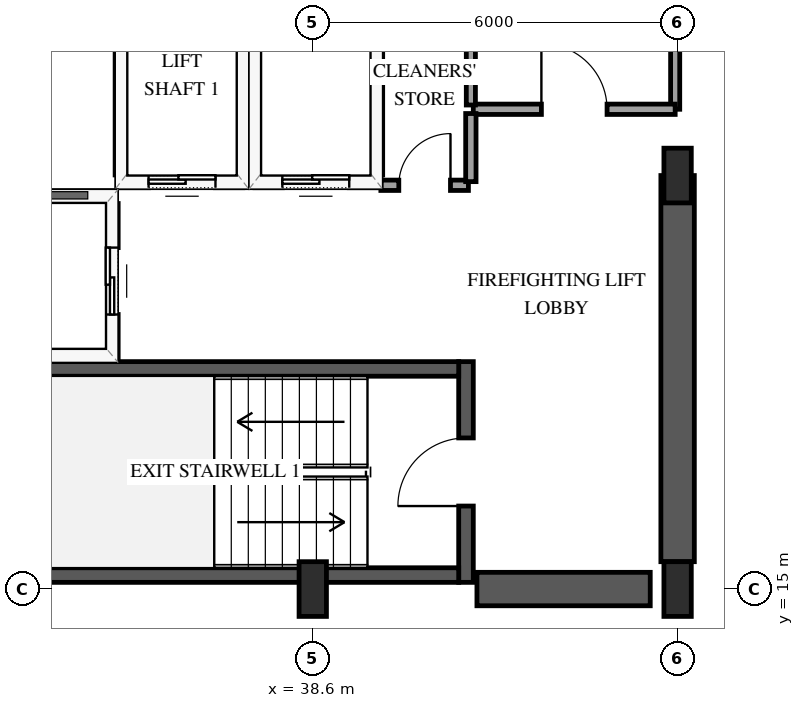
"""IFC4 building model, lengths in metres.
Left out: names, types, materials, properties, quantities, classifications, styles, units other than length and angle.
Written with IfcOpenShell. Run it as: python <this file> out.ifc"""

import sys

from ifc_helpers import new_model, si_unit, direction, frame, frame_2d, origin, origin_2d, place, context, subcontext, project, spatial, rectangle, extrude, element, fill, save


model = new_model("IFC4")
c1 = context("Model", 3, precision=1e-05, world=origin(), true_north=direction((0.0, 1.0)))
c2 = subcontext(c1, "Body", "Model", "MODEL_VIEW")
j1 = project(units=[si_unit("LENGTHUNIT", "METRE"), si_unit("PLANEANGLEUNIT", "RADIAN")], contexts=[c1])
p1 = place(None, origin())
s1 = spatial("IfcSite", under=j1, at=p1, CompositionType="ELEMENT")
p2 = place(p1, origin())
s2 = spatial("IfcBuilding", under=s1, at=p2, CompositionType="ELEMENT")
p3 = place(p2, frame((0.0, 0.0, 153.4)))
s3 = spatial("IfcBuildingStorey", under=s2, at=p3, CompositionType="ELEMENT", Elevation=153.4)
p4 = place(p3, frame((41.12, 15.11, 0.0), z_axis=(0.0, 0.0, 1.0), x_axis=(0.0, 1.0, 0.0)))
e1 = element("IfcWall", 1, at=p4, inside=s3, PredefinedType="SHEAR", context=c2, shape_type="SweptSolid", body=[
    extrude(rectangle(XDim=3.63, YDim=0.24, at=frame_2d((1.815, 0.0))), origin(), (0.0, 0.0, 1.0), 3.6),
])
p5 = place(p4, frame((1.255, 0.0, 0.0)))
e2 = element("IfcOpeningElement", 2, at=p5, cuts=e1, PredefinedType="OPENING", context=c2, shape_type="SweptSolid", body=[
    extrude(rectangle(XDim=1.12, YDim=2.15, at=frame_2d((0.56, 1.075))), frame((0.0, 0.13, 0.0), z_axis=(0.0, -1.0, 0.0), x_axis=(1.0, 0.0, 0.0)), (0.0, 0.0, 1.0), 0.26),
])
for number, where, z_axis, x_axis in (
    (3, (33.0, 15.23, 0.0), (0.0, 0.0, 1.0), (1.0, 0.0, 0.0)),
    (4, (33.0, 18.62, 0.0), (0.0, 0.0, 1.0), (1.0, 0.0, 0.0)),
):
    element("IfcWall", number, at=place(p3, frame(where, z_axis=z_axis, x_axis=x_axis)), inside=s3, PredefinedType="SHEAR", context=c2, shape_type="SweptSolid", body=[
        extrude(rectangle(XDim=8.0, YDim=0.24, at=frame_2d((4.0, 0.0))), origin(), (0.0, 0.0, 1.0), 3.6),
    ])
p6 = place(p3, frame((41.3, 15.0, 0.0), z_axis=(0.0, 0.0, 1.0), x_axis=(1.0, 0.0, 0.0)))
e5 = element("IfcWall", 5, at=p6, inside=s3, PredefinedType="SHEAR", context=c2, shape_type="SweptSolid", body=[
    extrude(rectangle(XDim=2.85, YDim=0.55, at=frame_2d((1.425, 0.0))), origin(), (0.0, 0.0, 1.0), 3.6),
])
p7 = place(p3, frame((44.6, 15.45, 0.0), z_axis=(0.0, 0.0, 1.0), x_axis=(0.0, 1.0, 0.0)))
e6 = element("IfcWall", 6, at=p7, inside=s3, PredefinedType="SHEAR", context=c2, shape_type="SweptSolid", body=[
    extrude(rectangle(XDim=6.35, YDim=0.55, at=frame_2d((3.175, 0.0))), origin(), (0.0, 0.0, 1.0), 3.6),
])
for number, where, z_axis, x_axis in (
    (7, (38.6, 15.0, 0.0), (0.0, 0.0, 1.0), (1.0, 0.0, 0.0)),
    (8, (44.6, 15.0, 0.0), (0.0, 0.0, 1.0), (1.0, 0.0, 0.0)),
    (9, (44.6, 21.8, 0.0), (0.0, 0.0, 1.0), (1.0, 0.0, 0.0)),
):
    element("IfcColumn", number, at=place(p3, frame(where, z_axis=z_axis, x_axis=x_axis)), inside=s3, PredefinedType="PILASTER", context=c2, shape_type="SweptSolid", body=[
        extrude(rectangle(XDim=0.45, YDim=0.9, at=origin_2d()), origin(), (0.0, 0.0, 1.0), 3.6),
    ])
p8 = place(p3, frame((35.45, 21.7, 0.0), z_axis=(0.0, 0.0, 1.0), x_axis=(1.0, 0.0, 0.0)))
e10 = element("IfcWall", 10, at=p8, inside=s3, PredefinedType="SOLIDWALL", context=c2, shape_type="SweptSolid", body=[
    extrude(rectangle(XDim=2.0, YDim=0.2, at=frame_2d((1.0, 0.0))), origin(), (0.0, 0.0, 1.0), 3.3),
])
p9 = place(p8, frame((0.45, 0.0, 0.0)))
e11 = element("IfcOpeningElement", 11, at=p9, cuts=e10, PredefinedType="OPENING", context=c2, shape_type="SweptSolid", body=[
    extrude(rectangle(XDim=1.1, YDim=2.15, at=frame_2d((0.55, 1.075))), frame((0.0, 0.11, 0.0), z_axis=(0.0, -1.0, 0.0), x_axis=(1.0, 0.0, 0.0)), (0.0, 0.0, 1.0), 0.22),
])
for number, where, z_axis, x_axis in (
    (12, (35.45, 21.81, 0.0), (0.0, 0.0, 1.0), (0.0, 1.0, 0.0)),
    (13, (37.45, 21.81, 0.0), (0.0, 0.0, 1.0), (0.0, 1.0, 0.0)),
):
    element("IfcWall", number, at=place(p3, frame(where, z_axis=z_axis, x_axis=x_axis)), inside=s3, PredefinedType="SOLIDWALL", context=c2, shape_type="SweptSolid", body=[
        extrude(rectangle(XDim=2.38, YDim=0.2, at=frame_2d((1.19, 0.0))), origin(), (0.0, 0.0, 1.0), 3.3),
    ])
p10 = place(p3, frame((37.65, 21.7, 0.0), z_axis=(0.0, 0.0, 1.0), x_axis=(1.0, 0.0, 0.0)))
e14 = element("IfcWall", 14, at=p10, inside=s3, PredefinedType="SOLIDWALL", context=c2, shape_type="SweptSolid", body=[
    extrude(rectangle(XDim=2.0, YDim=0.2, at=frame_2d((1.0, 0.0))), origin(), (0.0, 0.0, 1.0), 3.3),
])
p11 = place(p10, frame((0.45, 0.0, 0.0)))
e15 = element("IfcOpeningElement", 15, at=p11, cuts=e14, PredefinedType="OPENING", context=c2, shape_type="SweptSolid", body=[
    extrude(rectangle(XDim=1.1, YDim=2.15, at=frame_2d((0.55, 1.075))), frame((0.0, 0.11, 0.0), z_axis=(0.0, -1.0, 0.0), x_axis=(1.0, 0.0, 0.0)), (0.0, 0.0, 1.0), 0.22),
])
p12 = place(p3, frame((39.65, 21.81, 0.0), z_axis=(0.0, 0.0, 1.0), x_axis=(0.0, 1.0, 0.0)))
e16 = element("IfcWall", 16, at=p12, inside=s3, PredefinedType="SOLIDWALL", context=c2, shape_type="SweptSolid", body=[
    extrude(rectangle(XDim=2.38, YDim=0.2, at=frame_2d((1.19, 0.0))), origin(), (0.0, 0.0, 1.0), 3.3),
])
p13 = place(p3, frame((32.72, 21.45, 0.0), z_axis=(0.0, 0.0, 1.0), x_axis=(1.0, 0.0, 0.0)))
e17 = element("IfcWall", 17, at=p13, inside=s3, PredefinedType="SOLIDWALL", context=c2, shape_type="SweptSolid", body=[
    extrude(rectangle(XDim=2.58, YDim=0.2, at=frame_2d((1.29, 0.0))), origin(), (0.0, 0.0, 1.0), 3.3),
])
p14 = place(p3, frame((35.3, 18.79, 0.0), z_axis=(0.0, 0.0, 1.0), x_axis=(0.0, 1.0, 0.0)))
e18 = element("IfcWall", 18, at=p14, inside=s3, PredefinedType="SOLIDWALL", context=c2, shape_type="SweptSolid", body=[
    extrude(rectangle(XDim=2.55, YDim=0.2, at=frame_2d((1.275, 0.0))), origin(), (0.0, 0.0, 1.0), 3.3),
])
p15 = place(p14, frame((0.725, 0.0, 0.0)))
e19 = element("IfcOpeningElement", 19, at=p15, cuts=e18, PredefinedType="OPENING", context=c2, shape_type="SweptSolid", body=[
    extrude(rectangle(XDim=1.1, YDim=2.15, at=frame_2d((0.55, 1.075))), frame((0.0, 0.11, 0.0), z_axis=(0.0, -1.0, 0.0), x_axis=(1.0, 0.0, 0.0)), (0.0, 0.0, 1.0), 0.22),
])
p16 = place(p3, frame((44.56, 29.8, 0.0), z_axis=(0.0, 0.0, 1.0), x_axis=(0.0, -1.0, 0.0)))
e20 = element("IfcWall", 20, at=p16, inside=s3, PredefinedType="PARTITIONING", context=c2, shape_type="SweptSolid", body=[
    extrude(rectangle(XDim=6.91, YDim=0.15, at=frame_2d((3.455, 0.0))), origin(), (0.0, 0.0, 1.0), 2.34),
])
p17 = place(p16, frame((2.915, 0.0, 0.0)))
e21 = element("IfcOpeningElement", 21, at=p17, cuts=e20, PredefinedType="OPENING", context=c2, shape_type="SweptSolid", body=[
    extrude(rectangle(XDim=1.08, YDim=2.15, at=frame_2d((0.54, 1.075))), frame((0.0, 0.085, 0.0), z_axis=(0.0, -1.0, 0.0), x_axis=(1.0, 0.0, 0.0)), (0.0, 0.0, 1.0), 0.17),
])
p18 = place(p3, frame((41.24, 22.89, 0.0), z_axis=(0.0, 0.0, 1.0), x_axis=(1.0, 0.0, 0.0)))
e22 = element("IfcWall", 22, at=p18, inside=s3, PredefinedType="PARTITIONING", context=c2, shape_type="SweptSolid", body=[
    extrude(rectangle(XDim=3.32, YDim=0.17, at=frame_2d((1.66, 0.0))), origin(), (0.0, 0.0, 1.0), 3.3),
])
p19 = place(p18, frame((1.12, 0.0, 0.0)))
e23 = element("IfcOpeningElement", 23, at=p19, cuts=e22, PredefinedType="OPENING", context=c2, shape_type="SweptSolid", body=[
    extrude(rectangle(XDim=1.08, YDim=2.15, at=frame_2d((0.54, 1.075))), frame((0.0, 0.095, 0.0), z_axis=(0.0, -1.0, 0.0), x_axis=(1.0, 0.0, 0.0)), (0.0, 0.0, 1.0), 0.19),
])
p20 = place(p3, frame((41.2, 22.96, 0.0), z_axis=(0.0, 0.0, 1.0), x_axis=(0.0, 1.0, 0.0)))
e24 = element("IfcWall", 24, at=p20, inside=s3, PredefinedType="PARTITIONING", context=c2, shape_type="SweptSolid", body=[
    extrude(rectangle(XDim=1.69, YDim=0.15, at=frame_2d((0.845, 0.0))), origin(), (0.0, 0.0, 1.0), 3.3),
])
p21 = place(p3, frame((39.72, 21.64, 0.0), z_axis=(0.0, 0.0, 1.0), x_axis=(1.0, 0.0, 0.0)))
e25 = element("IfcWall", 25, at=p21, inside=s3, PredefinedType="PARTITIONING", context=c2, shape_type="SweptSolid", body=[
    extrude(rectangle(XDim=1.44, YDim=0.17, at=frame_2d((0.72, 0.0))), origin(), (0.0, 0.0, 1.0), 3.3),
])
p22 = place(p21, frame((0.295, 0.0, 0.0)))
e26 = element("IfcOpeningElement", 26, at=p22, cuts=e25, PredefinedType="OPENING", context=c2, shape_type="SweptSolid", body=[
    extrude(rectangle(XDim=0.85, YDim=2.1, at=frame_2d((0.425, 1.05))), frame((0.0, 0.095, 0.0), z_axis=(0.0, -1.0, 0.0), x_axis=(1.0, 0.0, 0.0)), (0.0, 0.0, 1.0), 0.19),
])
p23 = place(p3, frame((41.2, 21.7, 0.0), z_axis=(0.0, 0.0, 1.0), x_axis=(0.0, 1.0, 0.0)))
e27 = element("IfcWall", 27, at=p23, inside=s3, PredefinedType="PARTITIONING", context=c2, shape_type="SweptSolid", body=[
    extrude(rectangle(XDim=1.12, YDim=0.17, at=frame_2d((0.56, 0.0))), origin(), (0.0, 0.0, 1.0), 3.3),
])
p24 = place(p9, origin())
e28 = element("IfcDoor", 28, at=p24, inside=s3, OperationType="SLIDING_TO_LEFT", PredefinedType="DOOR", context=c2, shape_type="SweptSolid", body=[
    extrude(rectangle(XDim=1.1, YDim=2.15, at=frame_2d((0.55, 1.075))), frame((0.0, 0.025, 0.0), z_axis=(0.0, -1.0, 0.0), x_axis=(1.0, 0.0, 0.0)), (0.0, 0.0, 1.0), 0.05),
])
fill(e11, e28)
p25 = place(p11, origin())
e29 = element("IfcDoor", 29, at=p25, inside=s3, OperationType="SLIDING_TO_LEFT", PredefinedType="DOOR", context=c2, shape_type="SweptSolid", body=[
    extrude(rectangle(XDim=1.1, YDim=2.15, at=frame_2d((0.55, 1.075))), frame((0.0, 0.025, 0.0), z_axis=(0.0, -1.0, 0.0), x_axis=(1.0, 0.0, 0.0)), (0.0, 0.0, 1.0), 0.05),
])
fill(e15, e29)
p26 = place(p15, origin())
e30 = element("IfcDoor", 30, at=p26, inside=s3, OperationType="SLIDING_TO_LEFT", PredefinedType="DOOR", context=c2, shape_type="SweptSolid", body=[
    extrude(rectangle(XDim=1.1, YDim=2.15, at=frame_2d((0.55, 1.075))), frame((0.0, 0.025, 0.0), z_axis=(0.0, -1.0, 0.0), x_axis=(1.0, 0.0, 0.0)), (0.0, 0.0, 1.0), 0.05),
])
fill(e19, e30)
p27 = place(p5, origin())
e31 = element("IfcDoor", 31, at=p27, inside=s3, OperationType="SINGLE_SWING_LEFT", PredefinedType="DOOR", context=c2, shape_type="SweptSolid", body=[
    extrude(rectangle(XDim=1.12, YDim=2.15, at=frame_2d((0.56, 1.075))), frame((0.0, 0.025, 0.0), z_axis=(0.0, -1.0, 0.0), x_axis=(1.0, 0.0, 0.0)), (0.0, 0.0, 1.0), 0.05),
])
fill(e2, e31)
p28 = place(p19, origin())
e32 = element("IfcDoor", 32, at=p28, inside=s3, OperationType="SINGLE_SWING_LEFT", PredefinedType="DOOR", context=c2, shape_type="SweptSolid", body=[
    extrude(rectangle(XDim=1.08, YDim=2.15, at=frame_2d((0.54, 1.075))), frame((0.0, 0.025, 0.0), z_axis=(0.0, -1.0, 0.0), x_axis=(1.0, 0.0, 0.0)), (0.0, 0.0, 1.0), 0.05),
])
fill(e23, e32)
p29 = place(p22, origin())
e33 = element("IfcDoor", 33, at=p29, inside=s3, OperationType="SINGLE_SWING_RIGHT", PredefinedType="DOOR", context=c2, shape_type="SweptSolid", body=[
    extrude(rectangle(XDim=0.85, YDim=2.1, at=frame_2d((0.425, 1.05))), frame((0.0, 0.025, 0.0), z_axis=(0.0, -1.0, 0.0), x_axis=(1.0, 0.0, 0.0)), (0.0, 0.0, 1.0), 0.05),
])
fill(e26, e33)
save(model, sys.argv[1])
